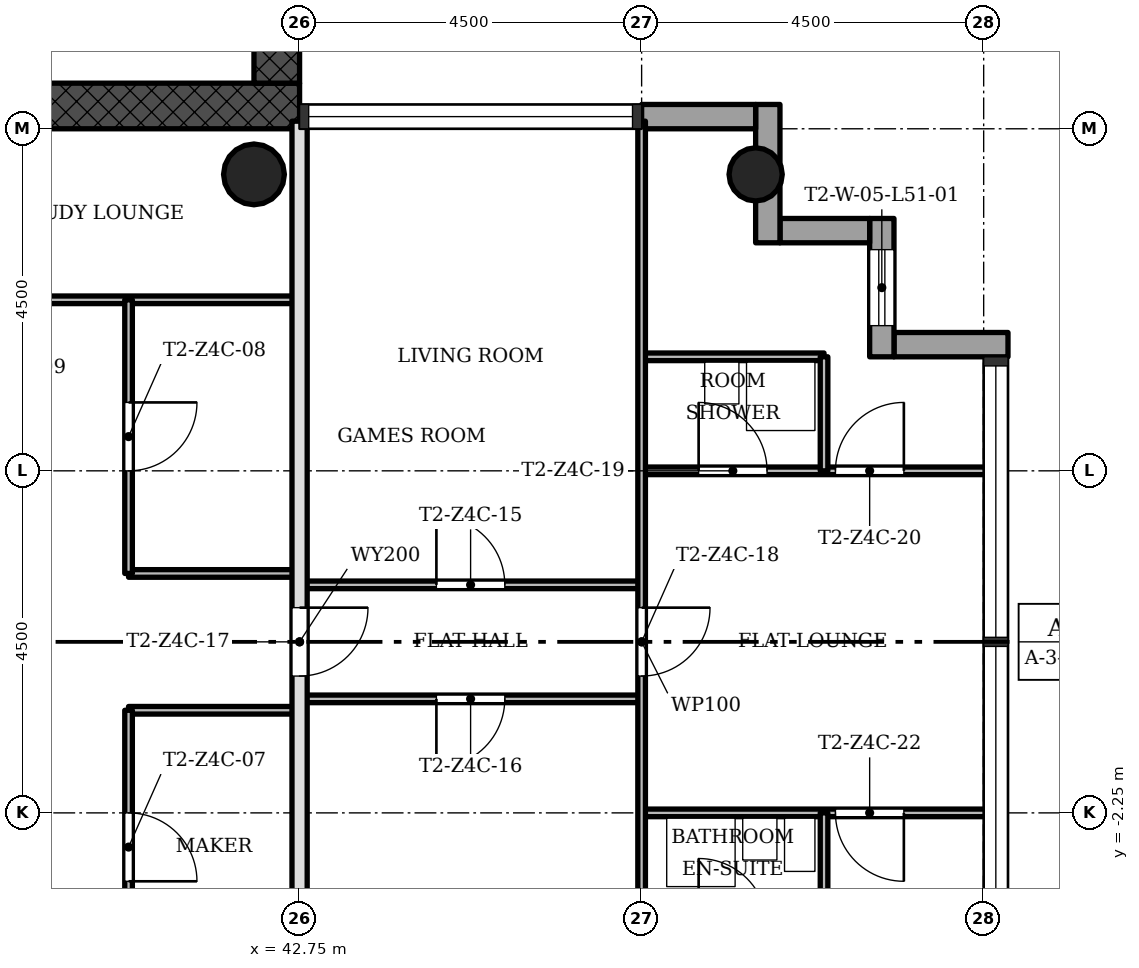
"""IFC4 building model, lengths in metres.
Left out: names, types, materials, properties, quantities, classifications, styles, units other than length and angle.
Written with IfcOpenShell. Run it as: python <this file> out.ifc"""

import sys

from ifc_helpers import new_model, si_unit, direction, frame, frame_2d, origin, origin_2d, place, context, subcontext, project, spatial, rectangle, hollow_circle, extrude, element, fill, save


model = new_model("IFC4")
c1 = context("Model", 3, precision=1e-05, world=origin(), true_north=direction((0.0, 1.0)))
c2 = subcontext(c1, "Body", "Model", "MODEL_VIEW")
j1 = project(units=[si_unit("LENGTHUNIT", "METRE"), si_unit("PLANEANGLEUNIT", "RADIAN")], contexts=[c1])
p1 = place(None, origin())
s1 = spatial("IfcSite", under=j1, at=p1, CompositionType="ELEMENT")
p2 = place(p1, origin())
s2 = spatial("IfcBuilding", under=s1, at=p2, CompositionType="ELEMENT")
p3 = place(p2, frame((0.0, 0.0, 185.8)))
s3 = spatial("IfcBuildingStorey", under=s2, at=p3, CompositionType="ELEMENT", Elevation=185.8)
p4 = place(p3, frame((29.85, 7.05, 0.0), z_axis=(0.0, 0.0, 1.0), x_axis=(1.0, 0.0, 0.0)))
e1 = element("IfcWall", 1, at=p4, inside=s3, PredefinedType="SHEAR", context=c2, shape_type="SweptSolid", body=[
    extrude(rectangle(XDim=12.9, YDim=0.6, at=frame_2d((6.45, 0.0))), origin(), (0.0, 0.0, 1.0), 3.4),
])
p5 = place(p4, frame((5.25, 0.0, 0.0)))
e2 = element("IfcOpeningElement", 2, at=p5, cuts=e1, PredefinedType="OPENING", context=c2, shape_type="SweptSolid", body=[
    extrude(rectangle(XDim=1.8, YDim=2.1, at=frame_2d((0.9, 1.05))), frame((0.0, 0.31, 0.0), z_axis=(0.0, -1.0, 0.0), x_axis=(1.0, 0.0, 0.0)), (0.0, 0.0, 1.0), 0.62),
])
p6 = place(p3, frame((42.45, 7.35, 0.0), z_axis=(0.0, 0.0, 1.0), x_axis=(0.0, 1.0, 0.0)))
e3 = element("IfcWall", 3, at=p6, inside=s3, PredefinedType="SHEAR", context=c2, shape_type="SweptSolid", body=[
    extrude(rectangle(XDim=8.4, YDim=0.6, at=frame_2d((4.2, 0.0))), origin(), (0.0, 0.0, 1.0), 3.4),
])
p7 = place(p3, frame((48.75, 6.15, 0.0), z_axis=(0.0, 0.0, 1.0), x_axis=(1.0, 0.0, 0.0)))
e4 = element("IfcColumn", 4, at=p7, inside=s3, PredefinedType="COLUMN", context=c2, shape_type="SweptSolid", body=[
    extrude(hollow_circle(Radius=0.35, WallThickness=0.025, at=origin_2d()), origin(), (0.0, 0.0, 1.0), 3.4),
])
p8 = place(p3, frame((42.15, 6.15, 0.0), z_axis=(0.0, 0.0, 1.0), x_axis=(1.0, 0.0, 0.0)))
e5 = element("IfcColumn", 5, at=p8, inside=s3, PredefinedType="COLUMN", context=c2, shape_type="SweptSolid", body=[
    extrude(hollow_circle(Radius=0.4, WallThickness=0.028, at=origin_2d()), origin(), (0.0, 0.0, 1.0), 3.4),
])
p9 = place(p3, frame((52.07, 3.91, -0.3), z_axis=(0.0, 0.0, 1.0), x_axis=(-1.0, 0.0, 0.0)))
e6 = element("IfcWall", 6, at=p9, inside=s3, PredefinedType="STANDARD", context=c2, shape_type="SweptSolid", body=[
    extrude(rectangle(XDim=1.5, YDim=0.32, at=frame_2d((0.75, 0.0))), origin(), (0.0, 0.0, 1.0), 3.4),
])
p10 = place(p3, frame((50.41, 3.75, -0.3), z_axis=(0.0, 0.0, 1.0), x_axis=(0.0, 1.0, 0.0)))
e7 = element("IfcWall", 7, at=p10, inside=s3, PredefinedType="STANDARD", context=c2, shape_type="SweptSolid", body=[
    extrude(rectangle(XDim=1.82, YDim=0.32, at=frame_2d((0.91, 0.0))), origin(), (0.0, 0.0, 1.0), 3.4),
])
p11 = place(p10, frame((0.41, 0.0, 1.2)))
e8 = element("IfcOpeningElement", 8, at=p11, cuts=e7, PredefinedType="OPENING", context=c2, shape_type="SweptSolid", body=[
    extrude(rectangle(XDim=1.0, YDim=1.5, at=frame_2d((0.5, 0.75))), frame((0.0, 0.17, 0.0), z_axis=(0.0, -1.0, 0.0), x_axis=(1.0, 0.0, 0.0)), (0.0, 0.0, 1.0), 0.34),
])
p12 = place(p3, frame((50.25, 5.41, -0.3), z_axis=(0.0, 0.0, 1.0), x_axis=(-1.0, 0.0, 0.0)))
e9 = element("IfcWall", 9, at=p12, inside=s3, PredefinedType="STANDARD", context=c2, shape_type="SweptSolid", body=[
    extrude(rectangle(XDim=1.18, YDim=0.32, at=frame_2d((0.59, 0.0))), origin(), (0.0, 0.0, 1.0), 3.4),
])
p13 = place(p3, frame((48.91, 5.25, -0.3), z_axis=(0.0, 0.0, 1.0), x_axis=(0.0, 1.0, 0.0)))
e10 = element("IfcWall", 10, at=p13, inside=s3, PredefinedType="STANDARD", context=c2, shape_type="SweptSolid", body=[
    extrude(rectangle(XDim=1.82, YDim=0.32, at=frame_2d((0.91, 0.0))), origin(), (0.0, 0.0, 1.0), 3.4),
])
p14 = place(p3, frame((48.75, 6.91, -0.3), z_axis=(0.0, 0.0, 1.0), x_axis=(-1.0, 0.0, 0.0)))
e11 = element("IfcWall", 11, at=p14, inside=s3, PredefinedType="STANDARD", context=c2, shape_type="SweptSolid", body=[
    extrude(rectangle(XDim=1.5, YDim=0.32, at=frame_2d((0.75, 0.0))), origin(), (0.0, 0.0, 1.0), 3.4),
])
p15 = place(p3, frame((51.85, -2.25, 0.0), z_axis=(0.0, 0.0, 1.0), x_axis=(-1.0, 0.0, 0.0)))
e12 = element("IfcWall", 12, at=p15, inside=s3, PredefinedType="PARTITIONING", context=c2, shape_type="SweptSolid", body=[
    extrude(rectangle(XDim=4.6, YDim=0.1, at=frame_2d((2.3, 0.0))), origin(), (0.0, 0.0, 1.0), 3.0),
])
p16 = place(p15, frame((1.15, 0.0, 0.0)))
e13 = element("IfcOpeningElement", 13, at=p16, cuts=e12, PredefinedType="OPENING", context=c2, shape_type="SweptSolid", body=[
    extrude(rectangle(XDim=0.9, YDim=2.1, at=frame_2d((0.45, 1.05))), frame((0.0, 0.06, 0.0), z_axis=(0.0, -1.0, 0.0), x_axis=(1.0, 0.0, 0.0)), (0.0, 0.0, 1.0), 0.12),
])
p17 = place(p3, frame((42.75, -0.9, 0.0), z_axis=(0.0, 0.0, 1.0), x_axis=(-1.0, 0.0, 0.0)))
e14 = element("IfcWall", 14, at=p17, inside=s3, PredefinedType="PARTITIONING", context=c2, shape_type="SweptSolid", body=[
    extrude(rectangle(XDim=2.25, YDim=0.1, at=frame_2d((1.125, 0.0))), origin(), (0.0, 0.0, 1.0), 3.0),
])
p18 = place(p3, frame((47.25, -0.75, 0.0), z_axis=(0.0, 0.0, 1.0), x_axis=(-1.0, 0.0, 0.0)))
e15 = element("IfcWall", 15, at=p18, inside=s3, PredefinedType="PARTITIONING", context=c2, shape_type="SweptSolid", body=[
    extrude(rectangle(XDim=4.5, YDim=0.1, at=frame_2d((2.25, 0.0))), origin(), (0.0, 0.0, 1.0), 3.0),
])
p19 = place(p18, frame((1.8, 0.0, 0.0)))
e16 = element("IfcOpeningElement", 16, at=p19, cuts=e15, PredefinedType="OPENING", context=c2, shape_type="SweptSolid", body=[
    extrude(rectangle(XDim=0.9, YDim=2.1, at=frame_2d((0.45, 1.05))), frame((0.0, 0.06, 0.0), z_axis=(0.0, -1.0, 0.0), x_axis=(1.0, 0.0, 0.0)), (0.0, 0.0, 1.0), 0.12),
])
p20 = place(p3, frame((47.25, 0.75, 0.0), z_axis=(0.0, 0.0, 1.0), x_axis=(-1.0, 0.0, 0.0)))
e17 = element("IfcWall", 17, at=p20, inside=s3, PredefinedType="PARTITIONING", context=c2, shape_type="SweptSolid", body=[
    extrude(rectangle(XDim=4.5, YDim=0.1, at=frame_2d((2.25, 0.0))), origin(), (0.0, 0.0, 1.0), 3.0),
])
p21 = place(p20, frame((1.8, 0.0, 0.0)))
e18 = element("IfcOpeningElement", 18, at=p21, cuts=e17, PredefinedType="OPENING", context=c2, shape_type="SweptSolid", body=[
    extrude(rectangle(XDim=0.9, YDim=2.1, at=frame_2d((0.45, 1.05))), frame((0.0, 0.06, 0.0), z_axis=(0.0, -1.0, 0.0), x_axis=(1.0, 0.0, 0.0)), (0.0, 0.0, 1.0), 0.12),
])
p22 = place(p3, frame((42.75, 0.9, 0.0), z_axis=(0.0, 0.0, 1.0), x_axis=(-1.0, 0.0, 0.0)))
e19 = element("IfcWall", 19, at=p22, inside=s3, PredefinedType="PARTITIONING", context=c2, shape_type="SweptSolid", body=[
    extrude(rectangle(XDim=2.25, YDim=0.1, at=frame_2d((1.125, 0.0))), origin(), (0.0, 0.0, 1.0), 3.0),
])
p23 = place(p3, frame((51.85, 2.25, 0.0), z_axis=(0.0, 0.0, 1.0), x_axis=(-1.0, 0.0, 0.0)))
e20 = element("IfcWall", 20, at=p23, inside=s3, PredefinedType="PARTITIONING", context=c2, shape_type="SweptSolid", body=[
    extrude(rectangle(XDim=4.6, YDim=0.1, at=frame_2d((2.3, 0.0))), origin(), (0.0, 0.0, 1.0), 3.0),
])
p24 = place(p23, frame((2.95, 0.0, 0.0)))
e21 = element("IfcOpeningElement", 21, at=p24, cuts=e20, PredefinedType="OPENING", context=c2, shape_type="SweptSolid", body=[
    extrude(rectangle(XDim=0.9, YDim=2.1, at=frame_2d((0.45, 1.05))), frame((0.0, 0.06, 0.0), z_axis=(0.0, -1.0, 0.0), x_axis=(1.0, 0.0, 0.0)), (0.0, 0.0, 1.0), 0.12),
])
p25 = place(p23, frame((1.15, 0.0, 0.0)))
e22 = element("IfcOpeningElement", 22, at=p25, cuts=e20, PredefinedType="OPENING", context=c2, shape_type="SweptSolid", body=[
    extrude(rectangle(XDim=0.9, YDim=2.1, at=frame_2d((0.45, 1.05))), frame((0.0, 0.06, 0.0), z_axis=(0.0, -1.0, 0.0), x_axis=(1.0, 0.0, 0.0)), (0.0, 0.0, 1.0), 0.12),
])
p26 = place(p3, frame((49.65, 3.75, 0.0), z_axis=(0.0, 0.0, 1.0), x_axis=(-1.0, 0.0, 0.0)))
e23 = element("IfcWall", 23, at=p26, inside=s3, PredefinedType="PARTITIONING", context=c2, shape_type="SweptSolid", body=[
    extrude(rectangle(XDim=2.4, YDim=0.1, at=frame_2d((1.2, 0.0))), origin(), (0.0, 0.0, 1.0), 3.0),
])
p27 = place(p3, frame((42.75, 4.5, 0.0), z_axis=(0.0, 0.0, 1.0), x_axis=(-1.0, 0.0, 0.0)))
e24 = element("IfcWall", 24, at=p27, inside=s3, PredefinedType="PARTITIONING", context=c2, shape_type="SweptSolid", body=[
    extrude(rectangle(XDim=5.25, YDim=0.1, at=frame_2d((2.625, 0.0))), origin(), (0.0, 0.0, 1.0), 3.0),
])
p28 = place(p27, frame((3.3, 0.0, 0.0)))
e25 = element("IfcOpeningElement", 25, at=p28, cuts=e24, PredefinedType="OPENING", context=c2, shape_type="SweptSolid", body=[
    extrude(rectangle(XDim=0.9, YDim=2.1, at=frame_2d((0.45, 1.05))), frame((0.0, 0.06, 0.0), z_axis=(0.0, -1.0, 0.0), x_axis=(1.0, 0.0, 0.0)), (0.0, 0.0, 1.0), 0.12),
])
for number, where, z_axis, x_axis in (
    (26, (49.65, -3.75, 0.0), (0.0, 0.0, 1.0), (0.0, 1.0, 0.0)),
    (27, (49.65, 2.25, 0.0), (0.0, 0.0, 1.0), (0.0, 1.0, 0.0)),
):
    element("IfcWall", number, at=place(p3, frame(where, z_axis=z_axis, x_axis=x_axis)), inside=s3, PredefinedType="PARTITIONING", context=c2, shape_type="SweptSolid", body=[
        extrude(rectangle(XDim=1.5, YDim=0.1, at=frame_2d((0.75, 0.0))), origin(), (0.0, 0.0, 1.0), 3.0),
    ])
p29 = place(p3, frame((47.25, -6.85, 0.0), z_axis=(0.0, 0.0, 1.0), x_axis=(0.0, 1.0, 0.0)))
e28 = element("IfcWall", 28, at=p29, inside=s3, PredefinedType="PARTITIONING", context=c2, shape_type="SweptSolid", body=[
    extrude(rectangle(XDim=13.7, YDim=0.1, at=frame_2d((6.85, 0.0))), origin(), (0.0, 0.0, 1.0), 3.0),
])
p30 = place(p29, frame((6.4, 0.0, 0.0)))
e29 = element("IfcOpeningElement", 29, at=p30, cuts=e28, PredefinedType="OPENING", context=c2, shape_type="SweptSolid", body=[
    extrude(rectangle(XDim=0.9, YDim=2.1, at=frame_2d((0.45, 1.05))), frame((0.0, 0.06, 0.0), z_axis=(0.0, -1.0, 0.0), x_axis=(1.0, 0.0, 0.0)), (0.0, 0.0, 1.0), 0.12),
])
p31 = place(p3, frame((42.75, -6.85, 0.0), z_axis=(0.0, 0.0, 1.0), x_axis=(0.0, 1.0, 0.0)))
e30 = element("IfcWall", 30, at=p31, inside=s3, PredefinedType="SOLIDWALL", context=c2, shape_type="SweptSolid", body=[
    extrude(rectangle(XDim=13.7, YDim=0.2, at=frame_2d((6.85, 0.0))), origin(), (0.0, 0.0, 1.0), 3.0),
])
p32 = place(p31, frame((6.4, 0.0, 0.0)))
e31 = element("IfcOpeningElement", 31, at=p32, cuts=e30, PredefinedType="OPENING", context=c2, shape_type="SweptSolid", body=[
    extrude(rectangle(XDim=0.9, YDim=2.1, at=frame_2d((0.45, 1.05))), frame((0.0, 0.11, 0.0), z_axis=(0.0, -1.0, 0.0), x_axis=(1.0, 0.0, 0.0)), (0.0, 0.0, 1.0), 0.22),
])
p33 = place(p3, frame((40.5, -4.5, 0.0), z_axis=(0.0, 0.0, 1.0), x_axis=(0.0, 1.0, 0.0)))
e32 = element("IfcWall", 32, at=p33, inside=s3, PredefinedType="PARTITIONING", context=c2, shape_type="SweptSolid", body=[
    extrude(rectangle(XDim=3.6, YDim=0.1, at=frame_2d((1.8, 0.0))), origin(), (0.0, 0.0, 1.0), 3.0),
])
p34 = place(p33, frame((1.35, 0.0, 0.0)))
e33 = element("IfcOpeningElement", 33, at=p34, cuts=e32, PredefinedType="OPENING", context=c2, shape_type="SweptSolid", body=[
    extrude(rectangle(XDim=0.9, YDim=2.1, at=frame_2d((0.45, 1.05))), frame((0.0, 0.06, 0.0), z_axis=(0.0, -1.0, 0.0), x_axis=(1.0, 0.0, 0.0)), (0.0, 0.0, 1.0), 0.12),
])
p35 = place(p3, frame((40.5, 0.9, 0.0), z_axis=(0.0, 0.0, 1.0), x_axis=(0.0, 1.0, 0.0)))
e34 = element("IfcWall", 34, at=p35, inside=s3, PredefinedType="PARTITIONING", context=c2, shape_type="SweptSolid", body=[
    extrude(rectangle(XDim=3.6, YDim=0.1, at=frame_2d((1.8, 0.0))), origin(), (0.0, 0.0, 1.0), 3.0),
])
p36 = place(p35, frame((1.35, 0.0, 0.0)))
e35 = element("IfcOpeningElement", 35, at=p36, cuts=e34, PredefinedType="OPENING", context=c2, shape_type="SweptSolid", body=[
    extrude(rectangle(XDim=0.9, YDim=2.1, at=frame_2d((0.45, 1.05))), frame((0.0, 0.06, 0.0), z_axis=(0.0, -1.0, 0.0), x_axis=(1.0, 0.0, 0.0)), (0.0, 0.0, 1.0), 0.12),
])
p37 = place(p34, origin())
e36 = element("IfcDoor", 36, at=p37, inside=s3, OperationType="SINGLE_SWING_LEFT", PredefinedType="DOOR", context=c2, shape_type="SweptSolid", body=[
    extrude(rectangle(XDim=0.9, YDim=2.1, at=frame_2d((0.45, 1.05))), frame((0.0, 0.025, 0.0), z_axis=(0.0, -1.0, 0.0), x_axis=(1.0, 0.0, 0.0)), (0.0, 0.0, 1.0), 0.05),
])
fill(e33, e36)
p38 = place(p36, origin())
e37 = element("IfcDoor", 37, at=p38, inside=s3, OperationType="SINGLE_SWING_RIGHT", PredefinedType="DOOR", context=c2, shape_type="SweptSolid", body=[
    extrude(rectangle(XDim=0.9, YDim=2.1, at=frame_2d((0.45, 1.05))), frame((0.0, 0.025, 0.0), z_axis=(0.0, -1.0, 0.0), x_axis=(1.0, 0.0, 0.0)), (0.0, 0.0, 1.0), 0.05),
])
fill(e35, e37)
p39 = place(p21, origin())
e38 = element("IfcDoor", 38, at=p39, inside=s3, OperationType="SINGLE_SWING_RIGHT", PredefinedType="DOOR", context=c2, shape_type="SweptSolid", body=[
    extrude(rectangle(XDim=0.9, YDim=2.1, at=frame_2d((0.45, 1.05))), frame((0.0, 0.025, 0.0), z_axis=(0.0, -1.0, 0.0), x_axis=(1.0, 0.0, 0.0)), (0.0, 0.0, 1.0), 0.05),
])
fill(e18, e38)
p40 = place(p19, origin())
e39 = element("IfcDoor", 39, at=p40, inside=s3, OperationType="SINGLE_SWING_LEFT", PredefinedType="DOOR", context=c2, shape_type="SweptSolid", body=[
    extrude(rectangle(XDim=0.9, YDim=2.1, at=frame_2d((0.45, 1.05))), frame((0.0, 0.025, 0.0), z_axis=(0.0, -1.0, 0.0), x_axis=(1.0, 0.0, 0.0)), (0.0, 0.0, 1.0), 0.05),
])
fill(e16, e39)
p41 = place(p32, origin())
e40 = element("IfcDoor", 40, at=p41, inside=s3, OperationType="SINGLE_SWING_RIGHT", PredefinedType="DOOR", context=c2, shape_type="SweptSolid", body=[
    extrude(rectangle(XDim=0.9, YDim=2.1, at=frame_2d((0.45, 1.05))), frame((0.0, 0.025, 0.0), z_axis=(0.0, -1.0, 0.0), x_axis=(1.0, 0.0, 0.0)), (0.0, 0.0, 1.0), 0.05),
])
fill(e31, e40)
p42 = place(p30, origin())
e41 = element("IfcDoor", 41, at=p42, inside=s3, OperationType="SINGLE_SWING_RIGHT", PredefinedType="DOOR", context=c2, shape_type="SweptSolid", body=[
    extrude(rectangle(XDim=0.9, YDim=2.1, at=frame_2d((0.45, 1.05))), frame((0.0, 0.025, 0.0), z_axis=(0.0, -1.0, 0.0), x_axis=(1.0, 0.0, 0.0)), (0.0, 0.0, 1.0), 0.05),
])
fill(e29, e41)
p43 = place(p24, origin())
e42 = element("IfcDoor", 42, at=p43, inside=s3, OperationType="SINGLE_SWING_RIGHT", PredefinedType="DOOR", context=c2, shape_type="SweptSolid", body=[
    extrude(rectangle(XDim=0.9, YDim=2.1, at=frame_2d((0.45, 1.05))), frame((0.0, 0.025, 0.0), z_axis=(0.0, -1.0, 0.0), x_axis=(1.0, 0.0, 0.0)), (0.0, 0.0, 1.0), 0.05),
])
fill(e21, e42)
p44 = place(p25, origin())
e43 = element("IfcDoor", 43, at=p44, inside=s3, OperationType="SINGLE_SWING_LEFT", PredefinedType="DOOR", context=c2, shape_type="SweptSolid", body=[
    extrude(rectangle(XDim=0.9, YDim=2.1, at=frame_2d((0.45, 1.05))), frame((0.0, 0.025, 0.0), z_axis=(0.0, -1.0, 0.0), x_axis=(1.0, 0.0, 0.0)), (0.0, 0.0, 1.0), 0.05),
])
fill(e22, e43)
p45 = place(p16, origin())
e44 = element("IfcDoor", 44, at=p45, inside=s3, OperationType="SINGLE_SWING_RIGHT", PredefinedType="DOOR", context=c2, shape_type="SweptSolid", body=[
    extrude(rectangle(XDim=0.9, YDim=2.1, at=frame_2d((0.45, 1.05))), frame((0.0, 0.025, 0.0), z_axis=(0.0, -1.0, 0.0), x_axis=(1.0, 0.0, 0.0)), (0.0, 0.0, 1.0), 0.05),
])
fill(e13, e44)
p46 = place(p11, origin())
e45 = element("IfcWindow", 45, at=p46, inside=s3, PartitioningType="SINGLE_PANEL", PredefinedType="WINDOW", context=c2, shape_type="SweptSolid", body=[
    extrude(rectangle(XDim=1.0, YDim=1.5, at=frame_2d((0.5, 0.75))), frame((0.0, 0.03, 0.0), z_axis=(0.0, -1.0, 0.0), x_axis=(1.0, 0.0, 0.0)), (0.0, 0.0, 1.0), 0.06),
])
fill(e8, e45)
save(model, sys.argv[1])
